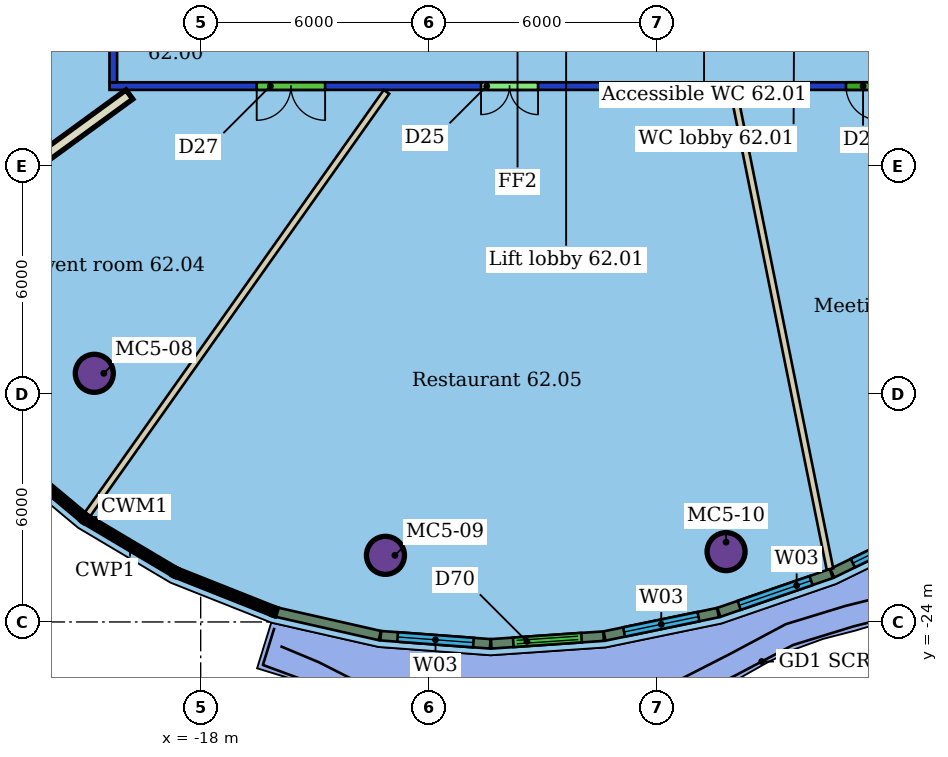
"""IFC4 building model, lengths in metres.
Left out: names, types, materials, properties, quantities, classifications, styles, units other than length and angle.
Written with IfcOpenShell. Run it as: python <this file> out.ifc"""

import sys

from ifc_helpers import new_model, si_unit, direction, frame, frame_2d, origin, origin_2d, place, context, subcontext, project, spatial, rectangle, hollow_circle, extrude, element, fill, save


model = new_model("IFC4")
c1 = context("Model", 3, precision=1e-05, world=origin(), true_north=direction((0.0, 1.0)))
c2 = subcontext(c1, "Body", "Model", "MODEL_VIEW")
j1 = project(units=[si_unit("LENGTHUNIT", "METRE"), si_unit("PLANEANGLEUNIT", "RADIAN")], contexts=[c1])
p1 = place(None, origin())
s1 = spatial("IfcSite", under=j1, at=p1, CompositionType="ELEMENT")
p2 = place(p1, origin())
s2 = spatial("IfcBuilding", under=s1, at=p2, CompositionType="ELEMENT")
p3 = place(p2, frame((0.0, 0.0, 254.1)))
s3 = spatial("IfcBuildingStorey", under=s2, at=p3, CompositionType="ELEMENT", Elevation=254.1)
for number, where, z_axis, x_axis in (
    (1, (-20.8, -17.457, 0.0), (0.0, 0.0, 1.0), (1.0, 0.0, 0.0)),
    (2, (-13.138, -22.247, 0.0), (0.0, 0.0, 1.0), (1.0, 0.0, 0.0)),
    (3, (-4.175, -22.149, 0.0), (0.0, 0.0, 1.0), (1.0, 0.0, 0.0)),
):
    element("IfcColumn", number, at=place(p3, frame(where, z_axis=z_axis, x_axis=x_axis)), inside=s3, PredefinedType="COLUMN", context=c2, shape_type="SweptSolid", body=[
        extrude(hollow_circle(Radius=0.5, WallThickness=0.04, at=origin_2d()), origin(), (0.0, 0.0, 1.0), 3.45),
    ])
p4 = place(p3, frame((8.4, -9.9, 0.0), z_axis=(0.0, 0.0, 1.0), x_axis=(-1.0, 0.0, 0.0)))
e4 = element("IfcWall", 4, at=p4, inside=s3, PredefinedType="PARTITIONING", context=c2, shape_type="SweptSolid", body=[
    extrude(rectangle(XDim=28.8, YDim=0.2, at=frame_2d((14.4, 0.0))), origin(), (0.0, 0.0, 1.0), 3.1),
])
p5 = place(p4, frame((23.126, 0.0, 0.0)))
e5 = element("IfcOpeningElement", 5, at=p5, cuts=e4, PredefinedType="OPENING", context=c2, shape_type="SweptSolid", body=[
    extrude(rectangle(XDim=1.8, YDim=2.4, at=frame_2d((0.9, 1.2))), frame((0.0, 0.11, 0.0), z_axis=(0.0, -1.0, 0.0), x_axis=(1.0, 0.0, 0.0)), (0.0, 0.0, 1.0), 0.22),
])
p6 = place(p4, frame((17.523, 0.0, 0.0)))
e6 = element("IfcOpeningElement", 6, at=p6, cuts=e4, PredefinedType="OPENING", context=c2, shape_type="SweptSolid", body=[
    extrude(rectangle(XDim=1.5, YDim=2.4, at=frame_2d((0.75, 1.2))), frame((0.0, 0.11, 0.0), z_axis=(0.0, -1.0, 0.0), x_axis=(1.0, 0.0, 0.0)), (0.0, 0.0, 1.0), 0.22),
])
p7 = place(p4, frame((8.52, 0.0, 0.0)))
e7 = element("IfcOpeningElement", 7, at=p7, cuts=e4, PredefinedType="OPENING", context=c2, shape_type="SweptSolid", body=[
    extrude(rectangle(XDim=0.9, YDim=2.1, at=frame_2d((0.45, 1.05))), frame((0.0, 0.11, 0.0), z_axis=(0.0, -1.0, 0.0), x_axis=(1.0, 0.0, 0.0)), (0.0, 0.0, 1.0), 0.22),
])
p8 = place(p4, frame((3.68, 0.0, 0.0)))
e8 = element("IfcOpeningElement", 8, at=p8, cuts=e4, PredefinedType="OPENING", context=c2, shape_type="SweptSolid", body=[
    extrude(rectangle(XDim=1.5, YDim=2.1, at=frame_2d((0.75, 1.05))), frame((0.0, 0.11, 0.0), z_axis=(0.0, -1.0, 0.0), x_axis=(1.0, 0.0, 0.0)), (0.0, 0.0, 1.0), 0.22),
])
p9 = place(p3, frame((-20.3, -9.8, 0.0), z_axis=(0.0, 0.0, 1.0), x_axis=(0.0, 1.0, 0.0)))
e9 = element("IfcWall", 9, at=p9, inside=s3, PredefinedType="PARTITIONING", context=c2, shape_type="SweptSolid", body=[
    extrude(rectangle(XDim=19.6, YDim=0.2, at=frame_2d((9.8, 0.0))), origin(), (0.0, 0.0, 1.0), 3.1),
])
p10 = place(p9, frame((14.022, 0.0, 0.0)))
e10 = element("IfcOpeningElement", 10, at=p10, cuts=e9, PredefinedType="OPENING", context=c2, shape_type="SweptSolid", body=[
    extrude(rectangle(XDim=1.5, YDim=2.1, at=frame_2d((0.75, 1.05))), frame((0.0, 0.11, 0.0), z_axis=(0.0, -1.0, 0.0), x_axis=(1.0, 0.0, 0.0)), (0.0, 0.0, 1.0), 0.22),
])
p11 = place(p9, frame((6.812, 0.0, 0.0)))
e11 = element("IfcOpeningElement", 11, at=p11, cuts=e9, PredefinedType="OPENING", context=c2, shape_type="SweptSolid", body=[
    extrude(rectangle(XDim=1.8, YDim=2.4, at=frame_2d((0.9, 1.2))), frame((0.0, 0.11, 0.0), z_axis=(0.0, -1.0, 0.0), x_axis=(1.0, 0.0, 0.0)), (0.0, 0.0, 1.0), 0.22),
])
p12 = place(p3, frame((-26.44, -14.909, 0.0), z_axis=(0.0, 0.0, 1.0), x_axis=(0.807908876314, 0.589307430441, 0.0)))
e12 = element("IfcWall", 12, at=p12, inside=s3, PredefinedType="PARTITIONING", context=c2, shape_type="SweptSolid", body=[
    extrude(rectangle(XDim=8.125, YDim=0.3, at=frame_2d((4.062, 0.0))), origin(), (0.0, 0.0, 1.0), 3.45),
])
p13 = place(p3, frame((-20.981, -21.174, 0.0), z_axis=(0.0, 0.0, 1.0), x_axis=(0.577574818001, 0.816337754615, 0.0)))
e13 = element("IfcWall", 13, at=p13, inside=s3, PredefinedType="PARTITIONING", context=c2, shape_type="SweptSolid", body=[
    extrude(rectangle(XDim=13.626, YDim=0.175, at=frame_2d((6.813, 0.0))), origin(), (0.0, 0.0, 1.0), 3.45),
])
p14 = place(p3, frame((-1.441, -22.607, 0.0), z_axis=(0.0, 0.0, 1.0), x_axis=(-0.197654886064, 0.980271669495, 0.0)))
e14 = element("IfcWall", 14, at=p14, inside=s3, PredefinedType="PARTITIONING", context=c2, shape_type="SweptSolid", body=[
    extrude(rectangle(XDim=12.844, YDim=0.175, at=frame_2d((6.422, 0.0))), origin(), (0.0, 0.0, 1.0), 3.45),
])
p15 = place(p3, frame((-16.001, -23.743, 0.0), z_axis=(0.0, 0.0, 1.0), x_axis=(0.975244788098, -0.221128024654, 0.0)))
e15 = element("IfcWall", 15, at=p15, inside=s3, PredefinedType="SOLIDWALL", context=c2, shape_type="SweptSolid", body=[
    extrude(rectangle(XDim=2.782, YDim=0.25, at=frame_2d((1.391, 0.0))), origin(), (0.0, 0.0, 1.0), 3.15),
])
p16 = place(p3, frame((-13.261, -24.362, 0.0), z_axis=(0.0, 0.0, 1.0), x_axis=(0.997260599476, -0.073968214338, 0.0)))
e16 = element("IfcWall", 16, at=p16, inside=s3, PredefinedType="SOLIDWALL", context=c2, shape_type="SweptSolid", body=[
    extrude(rectangle(XDim=2.888, YDim=0.25, at=frame_2d((1.444, 0.0))), origin(), (0.0, 0.0, 1.0), 3.15),
])
p17 = place(p16, frame((0.444, 0.0, 0.9)))
e17 = element("IfcOpeningElement", 17, at=p17, cuts=e16, PredefinedType="OPENING", context=c2, shape_type="SweptSolid", body=[
    extrude(rectangle(XDim=2.0, YDim=2.1, at=frame_2d((1.0, 1.05))), frame((0.0, 0.135, 0.0), z_axis=(0.0, -1.0, 0.0), x_axis=(1.0, 0.0, 0.0)), (0.0, 0.0, 1.0), 0.27),
])
p18 = place(p3, frame((-10.355, -24.575, 0.0), z_axis=(0.0, 0.0, 1.0), x_axis=(0.99766702353, 0.068267929221, 0.0)))
e18 = element("IfcWall", 18, at=p18, inside=s3, PredefinedType="SOLIDWALL", context=c2, shape_type="SweptSolid", body=[
    extrude(rectangle(XDim=2.965, YDim=0.25, at=frame_2d((1.482, 0.0))), origin(), (0.0, 0.0, 1.0), 3.15),
])
p19 = place(p18, frame((0.582, 0.0, 0.0)))
e19 = element("IfcOpeningElement", 19, at=p19, cuts=e18, PredefinedType="OPENING", context=c2, shape_type="SweptSolid", body=[
    extrude(rectangle(XDim=1.8, YDim=2.4, at=frame_2d((0.9, 1.2))), frame((0.0, 0.135, 0.0), z_axis=(0.0, -1.0, 0.0), x_axis=(1.0, 0.0, 0.0)), (0.0, 0.0, 1.0), 0.27),
])
p20 = place(p3, frame((-7.373, -24.37, 0.0), z_axis=(0.0, 0.0, 1.0), x_axis=(0.979363870878, 0.202104944072, 0.0)))
e20 = element("IfcWall", 20, at=p20, inside=s3, PredefinedType="SOLIDWALL", context=c2, shape_type="SweptSolid", body=[
    extrude(rectangle(XDim=3.048, YDim=0.25, at=frame_2d((1.524, 0.0))), origin(), (0.0, 0.0, 1.0), 3.15),
])
p21 = place(p20, frame((0.524, 0.0, 0.9)))
e21 = element("IfcOpeningElement", 21, at=p21, cuts=e20, PredefinedType="OPENING", context=c2, shape_type="SweptSolid", body=[
    extrude(rectangle(XDim=2.0, YDim=2.1, at=frame_2d((1.0, 1.05))), frame((0.0, 0.135, 0.0), z_axis=(0.0, -1.0, 0.0), x_axis=(1.0, 0.0, 0.0)), (0.0, 0.0, 1.0), 0.27),
])
p22 = place(p3, frame((-4.365, -23.747, 0.0), z_axis=(0.0, 0.0, 1.0), x_axis=(0.945414397725, 0.325870551867, 0.0)))
e22 = element("IfcWall", 22, at=p22, inside=s3, PredefinedType="SOLIDWALL", context=c2, shape_type="SweptSolid", body=[
    extrude(rectangle(XDim=3.132, YDim=0.25, at=frame_2d((1.566, 0.0))), origin(), (0.0, 0.0, 1.0), 3.15),
])
p23 = place(p22, frame((0.566, 0.0, 0.9)))
e23 = element("IfcOpeningElement", 23, at=p23, cuts=e22, PredefinedType="OPENING", context=c2, shape_type="SweptSolid", body=[
    extrude(rectangle(XDim=2.0, YDim=2.1, at=frame_2d((1.0, 1.05))), frame((0.0, 0.135, 0.0), z_axis=(0.0, -1.0, 0.0), x_axis=(1.0, 0.0, 0.0)), (0.0, 0.0, 1.0), 0.27),
])
p24 = place(p3, frame((-1.383, -22.718, 0.0), z_axis=(0.0, 0.0, 1.0), x_axis=(0.898675594267, 0.438613926214, 0.0)))
e24 = element("IfcWall", 24, at=p24, inside=s3, PredefinedType="SOLIDWALL", context=c2, shape_type="SweptSolid", body=[
    extrude(rectangle(XDim=3.21, YDim=0.25, at=frame_2d((1.605, 0.0))), origin(), (0.0, 0.0, 1.0), 3.15),
])
p25 = place(p24, frame((0.605, 0.0, 0.9)))
e25 = element("IfcOpeningElement", 25, at=p25, cuts=e24, PredefinedType="OPENING", context=c2, shape_type="SweptSolid", body=[
    extrude(rectangle(XDim=2.0, YDim=2.1, at=frame_2d((1.0, 1.05))), frame((0.0, 0.135, 0.0), z_axis=(0.0, -1.0, 0.0), x_axis=(1.0, 0.0, 0.0)), (0.0, 0.0, 1.0), 0.27),
])
p26 = place(p5, origin())
e26 = element("IfcDoor", 26, at=p26, inside=s3, OperationType="DOUBLE_DOOR_SINGLE_SWING", PredefinedType="DOOR", context=c2, shape_type="SweptSolid", body=[
    extrude(rectangle(XDim=1.8, YDim=2.4, at=frame_2d((0.9, 1.2))), frame((0.0, 0.025, 0.0), z_axis=(0.0, -1.0, 0.0), x_axis=(1.0, 0.0, 0.0)), (0.0, 0.0, 1.0), 0.05),
])
fill(e5, e26)
p27 = place(p6, origin())
e27 = element("IfcDoor", 27, at=p27, inside=s3, OperationType="DOUBLE_DOOR_SINGLE_SWING", PredefinedType="DOOR", context=c2, shape_type="SweptSolid", body=[
    extrude(rectangle(XDim=1.5, YDim=2.4, at=frame_2d((0.75, 1.2))), frame((0.0, 0.025, 0.0), z_axis=(0.0, -1.0, 0.0), x_axis=(1.0, 0.0, 0.0)), (0.0, 0.0, 1.0), 0.05),
])
fill(e6, e27)
p28 = place(p7, origin())
e28 = element("IfcDoor", 28, at=p28, inside=s3, OperationType="SINGLE_SWING_LEFT", PredefinedType="DOOR", context=c2, shape_type="SweptSolid", body=[
    extrude(rectangle(XDim=0.9, YDim=2.1, at=frame_2d((0.45, 1.05))), frame((0.0, 0.025, 0.0), z_axis=(0.0, -1.0, 0.0), x_axis=(1.0, 0.0, 0.0)), (0.0, 0.0, 1.0), 0.05),
])
fill(e7, e28)
p29 = place(p17, origin())
e29 = element("IfcWindow", 29, at=p29, inside=s3, PartitioningType="SINGLE_PANEL", PredefinedType="WINDOW", context=c2, shape_type="SweptSolid", body=[
    extrude(rectangle(XDim=2.0, YDim=2.1, at=frame_2d((1.0, 1.05))), frame((0.0, 0.03, 0.0), z_axis=(0.0, -1.0, 0.0), x_axis=(1.0, 0.0, 0.0)), (0.0, 0.0, 1.0), 0.06),
])
fill(e17, e29)
p30 = place(p19, origin())
e30 = element("IfcDoor", 30, at=p30, inside=s3, OperationType="DOUBLE_DOOR_SLIDING", PredefinedType="DOOR", context=c2, shape_type="SweptSolid", body=[
    extrude(rectangle(XDim=1.8, YDim=2.4, at=frame_2d((0.9, 1.2))), frame((0.0, 0.025, 0.0), z_axis=(0.0, -1.0, 0.0), x_axis=(1.0, 0.0, 0.0)), (0.0, 0.0, 1.0), 0.05),
])
fill(e19, e30)
p31 = place(p21, origin())
e31 = element("IfcWindow", 31, at=p31, inside=s3, PartitioningType="SINGLE_PANEL", PredefinedType="WINDOW", context=c2, shape_type="SweptSolid", body=[
    extrude(rectangle(XDim=2.0, YDim=2.1, at=frame_2d((1.0, 1.05))), frame((0.0, 0.03, 0.0), z_axis=(0.0, -1.0, 0.0), x_axis=(1.0, 0.0, 0.0)), (0.0, 0.0, 1.0), 0.06),
])
fill(e21, e31)
p32 = place(p23, origin())
e32 = element("IfcWindow", 32, at=p32, inside=s3, PartitioningType="SINGLE_PANEL", PredefinedType="WINDOW", context=c2, shape_type="SweptSolid", body=[
    extrude(rectangle(XDim=2.0, YDim=2.1, at=frame_2d((1.0, 1.05))), frame((0.0, 0.03, 0.0), z_axis=(0.0, -1.0, 0.0), x_axis=(1.0, 0.0, 0.0)), (0.0, 0.0, 1.0), 0.06),
])
fill(e23, e32)
p33 = place(p25, origin())
e33 = element("IfcWindow", 33, at=p33, inside=s3, PartitioningType="SINGLE_PANEL", PredefinedType="WINDOW", context=c2, shape_type="SweptSolid", body=[
    extrude(rectangle(XDim=2.0, YDim=2.1, at=frame_2d((1.0, 1.05))), frame((0.0, 0.03, 0.0), z_axis=(0.0, -1.0, 0.0), x_axis=(1.0, 0.0, 0.0)), (0.0, 0.0, 1.0), 0.06),
])
fill(e25, e33)
save(model, sys.argv[1])
